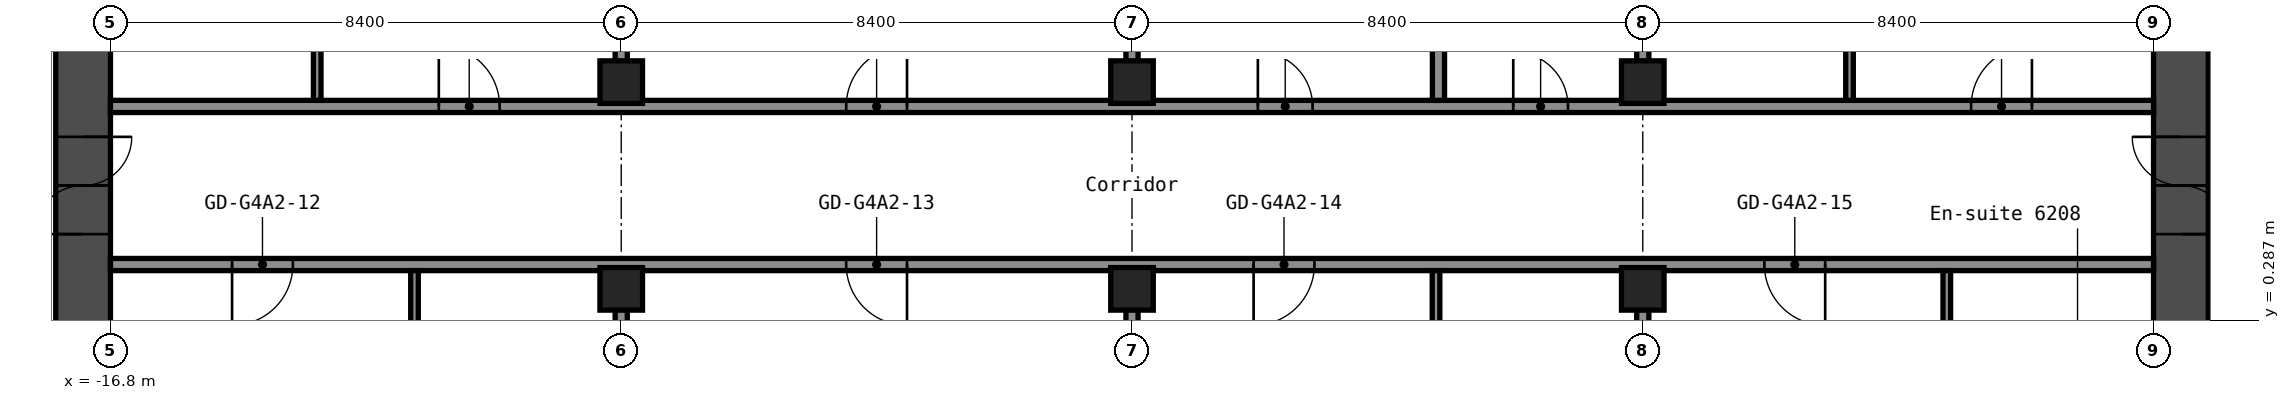
"""IFC4 building model, lengths in metres.
Left out: names, types, materials, properties, quantities, classifications, styles, units other than length and angle.
Written with IfcOpenShell. Run it as: python <this file> out.ifc"""

import sys

from ifc_helpers import new_model, si_unit, direction, frame, frame_2d, origin, origin_2d, place, context, subcontext, project, spatial, rectangle, hollow_rectangle, extrude, element, fill, save


model = new_model("IFC4")
c1 = context("Model", 3, precision=1e-05, world=origin(), true_north=direction((0.0, 1.0)))
c2 = subcontext(c1, "Body", "Model", "MODEL_VIEW")
j1 = project(units=[si_unit("LENGTHUNIT", "METRE"), si_unit("PLANEANGLEUNIT", "RADIAN")], contexts=[c1])
p1 = place(None, origin())
s1 = spatial("IfcSite", under=j1, at=p1, CompositionType="ELEMENT")
p2 = place(p1, origin())
s2 = spatial("IfcBuilding", under=s1, at=p2, CompositionType="ELEMENT")
p3 = place(p2, frame((0.0, 0.0, 218.6)))
s3 = spatial("IfcBuildingStorey", under=s2, at=p3, CompositionType="ELEMENT", Elevation=218.6)
for number, where, z_axis, x_axis in (
    (1, (-8.4, 0.8, 0.0), (0.0, 0.0, 1.0), (1.0, 0.0, 0.0)),
    (2, (-8.4, 4.2, 0.0), (0.0, 0.0, 1.0), (1.0, 0.0, 0.0)),
    (3, (0.0, 0.8, 0.0), (0.0, 0.0, 1.0), (1.0, 0.0, 0.0)),
    (4, (0.0, 4.2, 0.0), (0.0, 0.0, 1.0), (1.0, 0.0, 0.0)),
    (5, (8.4, 0.8, 0.0), (0.0, 0.0, 1.0), (1.0, 0.0, 0.0)),
    (6, (8.4, 4.2, 0.0), (0.0, 0.0, 1.0), (1.0, 0.0, 0.0)),
):
    element("IfcColumn", number, at=place(p3, frame(where, z_axis=z_axis, x_axis=x_axis)), inside=s3, PredefinedType="COLUMN", context=c2, shape_type="SweptSolid", body=[
        extrude(hollow_rectangle(XDim=0.7, YDim=0.7, WallThickness=0.028, at=origin_2d()), origin(), (0.0, 0.0, 1.0), 2.75),
    ])
p4 = place(p3, frame((-17.25, -8.4, 0.0), z_axis=(0.0, 0.0, 1.0), x_axis=(0.0, 1.0, 0.0)))
e7 = element("IfcWall", 7, at=p4, inside=s3, PredefinedType="SHEAR", context=c2, shape_type="SweptSolid", body=[
    extrude(rectangle(XDim=16.8, YDim=0.9, at=frame_2d((8.4, 0.0))), origin(), (0.0, 0.0, 1.0), 2.75),
])
p5 = place(p4, frame((10.1, 0.0, 0.0)))
e8 = element("IfcOpeningElement", 8, at=p5, cuts=e7, PredefinedType="OPENING", context=c2, shape_type="SweptSolid", body=[
    extrude(rectangle(XDim=1.6, YDim=2.1, at=frame_2d((0.8, 1.05))), frame((0.0, 0.46, 0.0), z_axis=(0.0, -1.0, 0.0), x_axis=(1.0, 0.0, 0.0)), (0.0, 0.0, 1.0), 0.92),
])
p6 = place(p3, frame((17.25, -8.4, 0.0), z_axis=(0.0, 0.0, 1.0), x_axis=(0.0, 1.0, 0.0)))
e9 = element("IfcWall", 9, at=p6, inside=s3, PredefinedType="SHEAR", context=c2, shape_type="SweptSolid", body=[
    extrude(rectangle(XDim=16.8, YDim=0.9, at=frame_2d((8.4, 0.0))), origin(), (0.0, 0.0, 1.0), 2.75),
])
p7 = place(p6, frame((10.1, 0.0, 0.0)))
e10 = element("IfcOpeningElement", 10, at=p7, cuts=e9, PredefinedType="OPENING", context=c2, shape_type="SweptSolid", body=[
    extrude(rectangle(XDim=1.6, YDim=2.1, at=frame_2d((0.8, 1.05))), frame((0.0, 0.46, 0.0), z_axis=(0.0, -1.0, 0.0), x_axis=(1.0, 0.0, 0.0)), (0.0, 0.0, 1.0), 0.92),
])
p8 = place(p3, frame((-16.8, 1.2, 0.0), z_axis=(0.0, 0.0, 1.0), x_axis=(1.0, 0.0, 0.0)))
e11 = element("IfcWall", 11, at=p8, inside=s3, PredefinedType="PARTITIONING", context=c2, shape_type="SweptSolid", body=[
    extrude(rectangle(XDim=33.6, YDim=0.2, at=frame_2d((16.8, 0.0))), origin(), (0.0, 0.0, 1.0), 2.75),
])
p9 = place(p8, frame((2.0, 0.0, 0.0)))
e12 = element("IfcOpeningElement", 12, at=p9, cuts=e11, PredefinedType="OPENING", context=c2, shape_type="SweptSolid", body=[
    extrude(rectangle(XDim=1.0, YDim=2.1, at=frame_2d((0.5, 1.05))), frame((0.0, 0.11, 0.0), z_axis=(0.0, -1.0, 0.0), x_axis=(1.0, 0.0, 0.0)), (0.0, 0.0, 1.0), 0.22),
])
p10 = place(p8, frame((12.1, 0.0, 0.0)))
e13 = element("IfcOpeningElement", 13, at=p10, cuts=e11, PredefinedType="OPENING", context=c2, shape_type="SweptSolid", body=[
    extrude(rectangle(XDim=1.0, YDim=2.1, at=frame_2d((0.5, 1.05))), frame((0.0, 0.11, 0.0), z_axis=(0.0, -1.0, 0.0), x_axis=(1.0, 0.0, 0.0)), (0.0, 0.0, 1.0), 0.22),
])
p11 = place(p8, frame((18.8, 0.0, 0.0)))
e14 = element("IfcOpeningElement", 14, at=p11, cuts=e11, PredefinedType="OPENING", context=c2, shape_type="SweptSolid", body=[
    extrude(rectangle(XDim=1.0, YDim=2.1, at=frame_2d((0.5, 1.05))), frame((0.0, 0.11, 0.0), z_axis=(0.0, -1.0, 0.0), x_axis=(1.0, 0.0, 0.0)), (0.0, 0.0, 1.0), 0.22),
])
p12 = place(p8, frame((27.2, 0.0, 0.0)))
e15 = element("IfcOpeningElement", 15, at=p12, cuts=e11, PredefinedType="OPENING", context=c2, shape_type="SweptSolid", body=[
    extrude(rectangle(XDim=1.0, YDim=2.1, at=frame_2d((0.5, 1.05))), frame((0.0, 0.11, 0.0), z_axis=(0.0, -1.0, 0.0), x_axis=(1.0, 0.0, 0.0)), (0.0, 0.0, 1.0), 0.22),
])
p13 = place(p3, frame((-16.8, 3.8, 0.0), z_axis=(0.0, 0.0, 1.0), x_axis=(1.0, 0.0, 0.0)))
e16 = element("IfcWall", 16, at=p13, inside=s3, PredefinedType="PARTITIONING", context=c2, shape_type="SweptSolid", body=[
    extrude(rectangle(XDim=33.6, YDim=0.2, at=frame_2d((16.8, 0.0))), origin(), (0.0, 0.0, 1.0), 2.75),
])
p14 = place(p13, frame((5.4, 0.0, 0.0)))
e17 = element("IfcOpeningElement", 17, at=p14, cuts=e16, PredefinedType="OPENING", context=c2, shape_type="SweptSolid", body=[
    extrude(rectangle(XDim=1.0, YDim=2.1, at=frame_2d((0.5, 1.05))), frame((0.0, 0.11, 0.0), z_axis=(0.0, -1.0, 0.0), x_axis=(1.0, 0.0, 0.0)), (0.0, 0.0, 1.0), 0.22),
])
p15 = place(p13, frame((12.1, 0.0, 0.0)))
e18 = element("IfcOpeningElement", 18, at=p15, cuts=e16, PredefinedType="OPENING", context=c2, shape_type="SweptSolid", body=[
    extrude(rectangle(XDim=1.0, YDim=2.1, at=frame_2d((0.5, 1.05))), frame((0.0, 0.11, 0.0), z_axis=(0.0, -1.0, 0.0), x_axis=(1.0, 0.0, 0.0)), (0.0, 0.0, 1.0), 0.22),
])
p16 = place(p13, frame((18.87, 0.0, 0.0)))
e19 = element("IfcOpeningElement", 19, at=p16, cuts=e16, PredefinedType="OPENING", context=c2, shape_type="SweptSolid", body=[
    extrude(rectangle(XDim=0.9, YDim=2.1, at=frame_2d((0.45, 1.05))), frame((0.0, 0.11, 0.0), z_axis=(0.0, -1.0, 0.0), x_axis=(1.0, 0.0, 0.0)), (0.0, 0.0, 1.0), 0.22),
])
p17 = place(p13, frame((23.07, 0.0, 0.0)))
e20 = element("IfcOpeningElement", 20, at=p17, cuts=e16, PredefinedType="OPENING", context=c2, shape_type="SweptSolid", body=[
    extrude(rectangle(XDim=0.9, YDim=2.1, at=frame_2d((0.45, 1.05))), frame((0.0, 0.11, 0.0), z_axis=(0.0, -1.0, 0.0), x_axis=(1.0, 0.0, 0.0)), (0.0, 0.0, 1.0), 0.22),
])
p18 = place(p13, frame((30.6, 0.0, 0.0)))
e21 = element("IfcOpeningElement", 21, at=p18, cuts=e16, PredefinedType="OPENING", context=c2, shape_type="SweptSolid", body=[
    extrude(rectangle(XDim=1.0, YDim=2.1, at=frame_2d((0.5, 1.05))), frame((0.0, 0.11, 0.0), z_axis=(0.0, -1.0, 0.0), x_axis=(1.0, 0.0, 0.0)), (0.0, 0.0, 1.0), 0.22),
])
for number, where, z_axis, x_axis in (
    (22, (-13.4, 3.9, 0.0), (0.0, 0.0, 1.0), (0.0, 1.0, 0.0)),
    (23, (-11.8, -2.2, 0.0), (0.0, 0.0, 1.0), (0.0, 1.0, 0.0)),
):
    element("IfcWall", number, at=place(p3, frame(where, z_axis=z_axis, x_axis=x_axis)), inside=s3, PredefinedType="PARTITIONING", context=c2, shape_type="SweptSolid", body=[
        extrude(rectangle(XDim=3.3, YDim=0.125, at=frame_2d((1.65, 0.0))), origin(), (0.0, 0.0, 1.0), 2.75),
    ])
for number, where, z_axis, x_axis in (
    (24, (-8.4, -15.55, 0.0), (0.0, 0.0, 1.0), (0.0, 1.0, 0.0)),
    (25, (-8.4, 4.54, 0.0), (0.0, 0.0, 1.0), (0.0, 1.0, 0.0)),
    (26, (0.0, -15.55, 0.0), (0.0, 0.0, 1.0), (0.0, 1.0, 0.0)),
    (27, (0.0, 4.54, 0.0), (0.0, 0.0, 1.0), (0.0, 1.0, 0.0)),
):
    element("IfcWall", number, at=place(p3, frame(where, z_axis=z_axis, x_axis=x_axis)), inside=s3, PredefinedType="PARTITIONING", context=c2, shape_type="SweptSolid", body=[
        extrude(rectangle(XDim=16.01, YDim=0.2, at=frame_2d((8.005, 0.0))), origin(), (0.0, 0.0, 1.0), 2.75),
    ])
p19 = place(p3, frame((5.0, -2.2, 0.0), z_axis=(0.0, 0.0, 1.0), x_axis=(0.0, 1.0, 0.0)))
e28 = element("IfcWall", 28, at=p19, inside=s3, PredefinedType="PARTITIONING", context=c2, shape_type="SweptSolid", body=[
    extrude(rectangle(XDim=3.3, YDim=0.125, at=frame_2d((1.65, 0.0))), origin(), (0.0, 0.0, 1.0), 2.75),
])
p20 = place(p3, frame((5.04, 3.9, 0.0), z_axis=(0.0, 0.0, 1.0), x_axis=(0.0, 1.0, 0.0)))
e29 = element("IfcWall", 29, at=p20, inside=s3, PredefinedType="PARTITIONING", context=c2, shape_type="SweptSolid", body=[
    extrude(rectangle(XDim=16.65, YDim=0.2, at=frame_2d((8.325, 0.0))), origin(), (0.0, 0.0, 1.0), 2.75),
])
for number, where, z_axis, x_axis in (
    (30, (8.4, -15.55, 0.0), (0.0, 0.0, 1.0), (0.0, 1.0, 0.0)),
    (31, (8.4, 4.54, 0.0), (0.0, 0.0, 1.0), (0.0, 1.0, 0.0)),
):
    element("IfcWall", number, at=place(p3, frame(where, z_axis=z_axis, x_axis=x_axis)), inside=s3, PredefinedType="PARTITIONING", context=c2, shape_type="SweptSolid", body=[
        extrude(rectangle(XDim=16.01, YDim=0.2, at=frame_2d((8.005, 0.0))), origin(), (0.0, 0.0, 1.0), 2.75),
    ])
for number, where, z_axis, x_axis in (
    (32, (11.8, 3.9, 0.0), (0.0, 0.0, 1.0), (0.0, 1.0, 0.0)),
    (33, (13.4, -2.2, 0.0), (0.0, 0.0, 1.0), (0.0, 1.0, 0.0)),
):
    element("IfcWall", number, at=place(p3, frame(where, z_axis=z_axis, x_axis=x_axis)), inside=s3, PredefinedType="PARTITIONING", context=c2, shape_type="SweptSolid", body=[
        extrude(rectangle(XDim=3.3, YDim=0.125, at=frame_2d((1.65, 0.0))), origin(), (0.0, 0.0, 1.0), 2.75),
    ])
p21 = place(p5, origin())
e34 = element("IfcDoor", 34, at=p21, inside=s3, OperationType="DOUBLE_DOOR_SINGLE_SWING", PredefinedType="DOOR", context=c2, shape_type="SweptSolid", body=[
    extrude(rectangle(XDim=1.6, YDim=2.1, at=frame_2d((0.8, 1.05))), frame((0.0, 0.025, 0.0), z_axis=(0.0, -1.0, 0.0), x_axis=(1.0, 0.0, 0.0)), (0.0, 0.0, 1.0), 0.05),
])
fill(e8, e34)
p22 = place(p7, origin())
e35 = element("IfcDoor", 35, at=p22, inside=s3, OperationType="DOUBLE_DOOR_SINGLE_SWING", PredefinedType="DOOR", context=c2, shape_type="SweptSolid", body=[
    extrude(rectangle(XDim=1.6, YDim=2.1, at=frame_2d((0.8, 1.05))), frame((0.0, 0.025, 0.0), z_axis=(0.0, -1.0, 0.0), x_axis=(1.0, 0.0, 0.0)), (0.0, 0.0, 1.0), 0.05),
])
fill(e10, e35)
p23 = place(p9, origin())
e36 = element("IfcDoor", 36, at=p23, inside=s3, OperationType="SINGLE_SWING_LEFT", PredefinedType="DOOR", context=c2, shape_type="SweptSolid", body=[
    extrude(rectangle(XDim=1.0, YDim=2.1, at=frame_2d((0.5, 1.05))), frame((0.0, 0.025, 0.0), z_axis=(0.0, -1.0, 0.0), x_axis=(1.0, 0.0, 0.0)), (0.0, 0.0, 1.0), 0.05),
])
fill(e12, e36)
p24 = place(p10, origin())
e37 = element("IfcDoor", 37, at=p24, inside=s3, OperationType="SINGLE_SWING_RIGHT", PredefinedType="DOOR", context=c2, shape_type="SweptSolid", body=[
    extrude(rectangle(XDim=1.0, YDim=2.1, at=frame_2d((0.5, 1.05))), frame((0.0, 0.025, 0.0), z_axis=(0.0, -1.0, 0.0), x_axis=(1.0, 0.0, 0.0)), (0.0, 0.0, 1.0), 0.05),
])
fill(e13, e37)
p25 = place(p11, origin())
e38 = element("IfcDoor", 38, at=p25, inside=s3, OperationType="SINGLE_SWING_LEFT", PredefinedType="DOOR", context=c2, shape_type="SweptSolid", body=[
    extrude(rectangle(XDim=1.0, YDim=2.1, at=frame_2d((0.5, 1.05))), frame((0.0, 0.025, 0.0), z_axis=(0.0, -1.0, 0.0), x_axis=(1.0, 0.0, 0.0)), (0.0, 0.0, 1.0), 0.05),
])
fill(e14, e38)
p26 = place(p12, origin())
e39 = element("IfcDoor", 39, at=p26, inside=s3, OperationType="SINGLE_SWING_RIGHT", PredefinedType="DOOR", context=c2, shape_type="SweptSolid", body=[
    extrude(rectangle(XDim=1.0, YDim=2.1, at=frame_2d((0.5, 1.05))), frame((0.0, 0.025, 0.0), z_axis=(0.0, -1.0, 0.0), x_axis=(1.0, 0.0, 0.0)), (0.0, 0.0, 1.0), 0.05),
])
fill(e15, e39)
p27 = place(p14, origin())
e40 = element("IfcDoor", 40, at=p27, inside=s3, OperationType="SINGLE_SWING_RIGHT", PredefinedType="DOOR", context=c2, shape_type="SweptSolid", body=[
    extrude(rectangle(XDim=1.0, YDim=2.1, at=frame_2d((0.5, 1.05))), frame((0.0, 0.025, 0.0), z_axis=(0.0, -1.0, 0.0), x_axis=(1.0, 0.0, 0.0)), (0.0, 0.0, 1.0), 0.05),
])
fill(e17, e40)
p28 = place(p15, origin())
e41 = element("IfcDoor", 41, at=p28, inside=s3, OperationType="SINGLE_SWING_LEFT", PredefinedType="DOOR", context=c2, shape_type="SweptSolid", body=[
    extrude(rectangle(XDim=1.0, YDim=2.1, at=frame_2d((0.5, 1.05))), frame((0.0, 0.025, 0.0), z_axis=(0.0, -1.0, 0.0), x_axis=(1.0, 0.0, 0.0)), (0.0, 0.0, 1.0), 0.05),
])
fill(e18, e41)
p29 = place(p16, origin())
e42 = element("IfcDoor", 42, at=p29, inside=s3, OperationType="SINGLE_SWING_RIGHT", PredefinedType="DOOR", context=c2, shape_type="SweptSolid", body=[
    extrude(rectangle(XDim=0.9, YDim=2.1, at=frame_2d((0.45, 1.05))), frame((0.0, 0.025, 0.0), z_axis=(0.0, -1.0, 0.0), x_axis=(1.0, 0.0, 0.0)), (0.0, 0.0, 1.0), 0.05),
])
fill(e19, e42)
p30 = place(p17, origin())
e43 = element("IfcDoor", 43, at=p30, inside=s3, OperationType="SINGLE_SWING_RIGHT", PredefinedType="DOOR", context=c2, shape_type="SweptSolid", body=[
    extrude(rectangle(XDim=0.9, YDim=2.1, at=frame_2d((0.45, 1.05))), frame((0.0, 0.025, 0.0), z_axis=(0.0, -1.0, 0.0), x_axis=(1.0, 0.0, 0.0)), (0.0, 0.0, 1.0), 0.05),
])
fill(e20, e43)
p31 = place(p18, origin())
e44 = element("IfcDoor", 44, at=p31, inside=s3, OperationType="SINGLE_SWING_LEFT", PredefinedType="DOOR", context=c2, shape_type="SweptSolid", body=[
    extrude(rectangle(XDim=1.0, YDim=2.1, at=frame_2d((0.5, 1.05))), frame((0.0, 0.025, 0.0), z_axis=(0.0, -1.0, 0.0), x_axis=(1.0, 0.0, 0.0)), (0.0, 0.0, 1.0), 0.05),
])
fill(e21, e44)
save(model, sys.argv[1])
